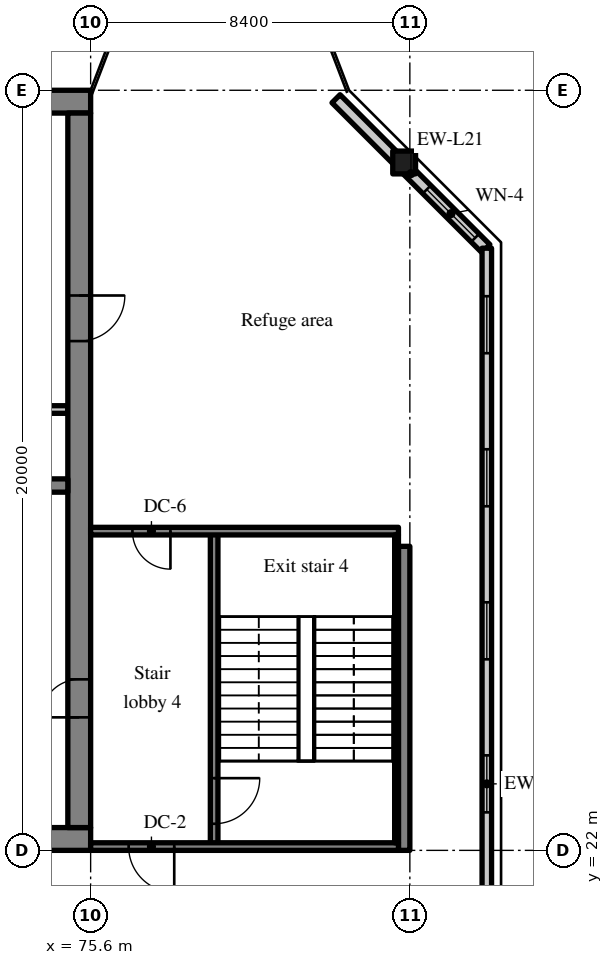
"""IFC4 building model, lengths in metres.
Left out: names, types, materials, properties, quantities, classifications, styles, units other than length and angle.
Written with IfcOpenShell. Run it as: python <this file> out.ifc"""

import sys

from ifc_helpers import new_model, si_unit, direction, frame, frame_2d, origin, origin_2d, place, context, subcontext, project, spatial, rectangle, extrude, source, transform, mapped, element, fill, save


model = new_model("IFC4")
c1 = context("Model", 3, precision=1e-05, world=origin(), true_north=direction((0.0, 1.0)))
c2 = subcontext(c1, "Body", "Model", "MODEL_VIEW")
j1 = project(units=[si_unit("LENGTHUNIT", "METRE"), si_unit("PLANEANGLEUNIT", "RADIAN")], contexts=[c1])
p1 = place(None, origin())
s1 = spatial("IfcSite", under=j1, at=p1, CompositionType="ELEMENT")
p2 = place(p1, origin())
s2 = spatial("IfcBuilding", under=s1, at=p2, CompositionType="ELEMENT")
p3 = place(p2, frame((0.0, 0.0, 253.0)))
s3 = spatial("IfcBuildingStorey", under=s2, at=p3, CompositionType="ELEMENT", Elevation=253.0)
m1 = source(origin(), c2, "Body", "SweptSolid", [
    extrude(rectangle(XDim=50.4, YDim=0.6, at=frame_2d((25.2, 0.0))), origin(), (0.0, 0.0, 1.0), 3.62),
])
p4 = place(p3, frame((25.2, 22.3, 0.0), z_axis=(0.0, 0.0, 1.0), x_axis=(1.0, 0.0, 0.0)))
e1 = element("IfcWall", 1, at=p4, inside=s3, PredefinedType="SHEAR", context=c2, shape_type="MappedRepresentation", body=[
    mapped(m1, transform((0.0, 0.0, 0.0), scale=1.0)),
])
m2 = source(origin(), c2, "Body", "SweptSolid", [
    extrude(rectangle(XDim=1.8, YDim=2.1, at=frame_2d((0.9, 1.05))), frame((0.0, 0.31, 0.0), z_axis=(0.0, -1.0, 0.0), x_axis=(1.0, 0.0, 0.0)), (0.0, 0.0, 1.0), 0.62),
])
p5 = place(p4, frame((15.9, 0.0, 0.0)))
e2 = element("IfcOpeningElement", 2, at=p5, cuts=e1, PredefinedType="OPENING", context=c2, shape_type="MappedRepresentation", body=[
    mapped(m2, transform((0.0, 0.0, 0.0), scale=1.0)),
])
m3 = source(origin(), c2, "Body", "SweptSolid", [
    extrude(rectangle(XDim=0.9, YDim=2.1, at=frame_2d((0.45, 1.05))), frame((0.0, 0.31, 0.0), z_axis=(0.0, -1.0, 0.0), x_axis=(1.0, 0.0, 0.0)), (0.0, 0.0, 1.0), 0.62),
])
p6 = place(p4, frame((21.513, 0.0, 0.0)))
e3 = element("IfcOpeningElement", 3, at=p6, cuts=e1, PredefinedType="OPENING", context=c2, shape_type="MappedRepresentation", body=[
    mapped(m3, transform((0.0, 0.0, 0.0), scale=1.0)),
])
p7 = place(p4, frame((32.7, 0.0, 0.0)))
e4 = element("IfcOpeningElement", 4, at=p7, cuts=e1, PredefinedType="OPENING", context=c2, shape_type="MappedRepresentation", body=[
    mapped(m2, transform((0.0, 0.0, 0.0), scale=1.0)),
])
m4 = source(origin(), c2, "Body", "SweptSolid", [
    extrude(rectangle(XDim=1.2, YDim=2.1, at=frame_2d((0.6, 1.05))), frame((0.0, 0.31, 0.0), z_axis=(0.0, -1.0, 0.0), x_axis=(1.0, 0.0, 0.0)), (0.0, 0.0, 1.0), 0.62),
])
p8 = place(p4, frame((6.488, 0.0, 0.0)))
e5 = element("IfcOpeningElement", 5, at=p8, cuts=e1, PredefinedType="OPENING", context=c2, shape_type="MappedRepresentation", body=[
    mapped(m4, transform((0.0, 0.0, 0.0), scale=1.0)),
])
p9 = place(p4, frame((47.925, 0.0, 0.0)))
e6 = element("IfcOpeningElement", 6, at=p9, cuts=e1, PredefinedType="OPENING", context=c2, shape_type="MappedRepresentation", body=[
    mapped(m4, transform((0.0, 0.0, 0.0), scale=1.0)),
])
p10 = place(p3, frame((25.2, 41.7, 0.0), z_axis=(0.0, 0.0, 1.0), x_axis=(1.0, 0.0, 0.0)))
e7 = element("IfcWall", 7, at=p10, inside=s3, PredefinedType="SHEAR", context=c2, shape_type="MappedRepresentation", body=[
    mapped(m1, transform((0.0, 0.0, 0.0), scale=1.0)),
])
m5 = source(origin(), c2, "Body", "SweptSolid", [
    extrude(rectangle(XDim=18.8, YDim=0.6, at=frame_2d((9.4, 0.0))), origin(), (0.0, 0.0, 1.0), 3.62),
])
p11 = place(p3, frame((75.3, 22.6, 0.0), z_axis=(0.0, 0.0, 1.0), x_axis=(0.0, 1.0, 0.0)))
e8 = element("IfcWall", 8, at=p11, inside=s3, PredefinedType="SHEAR", context=c2, shape_type="MappedRepresentation", body=[
    mapped(m5, transform((0.0, 0.0, 0.0), scale=1.0)),
])
m6 = source(origin(), c2, "Body", "SweptSolid", [
    extrude(rectangle(XDim=1.0, YDim=2.1, at=frame_2d((0.5, 1.05))), frame((0.0, 0.31, 0.0), z_axis=(0.0, -1.0, 0.0), x_axis=(1.0, 0.0, 0.0)), (0.0, 0.0, 1.0), 0.62),
])
p12 = place(p11, frame((2.9, 0.0, 0.0)))
e9 = element("IfcOpeningElement", 9, at=p12, cuts=e8, PredefinedType="OPENING", context=c2, shape_type="MappedRepresentation", body=[
    mapped(m6, transform((0.0, 0.0, 0.0), scale=1.0)),
])
p13 = place(p11, frame((12.8, 0.0, 0.0)))
e10 = element("IfcOpeningElement", 10, at=p13, cuts=e8, PredefinedType="OPENING", context=c2, shape_type="MappedRepresentation", body=[
    mapped(m4, transform((0.0, 0.0, 0.0), scale=1.0)),
])
m7 = source(origin(), c2, "Body", "SweptSolid", [
    extrude(rectangle(XDim=7.625, YDim=0.35, at=frame_2d((3.812, 0.0))), origin(), (0.0, 0.0, 1.0), 3.62),
])
p14 = place(p3, frame((67.375, 31.6, 0.0), z_axis=(0.0, 0.0, 1.0), x_axis=(1.0, 0.0, 0.0)))
e11 = element("IfcWall", 11, at=p14, inside=s3, PredefinedType="SHEAR", context=c2, shape_type="MappedRepresentation", body=[
    mapped(m7, transform((0.0, 0.0, 0.0), scale=1.0)),
])
m8 = source(origin(), c2, "Body", "SweptSolid", [
    extrude(rectangle(XDim=1.1, YDim=2.1, at=frame_2d((0.55, 1.05))), frame((0.0, 0.185, 0.0), z_axis=(0.0, -1.0, 0.0), x_axis=(1.0, 0.0, 0.0)), (0.0, 0.0, 1.0), 0.37),
])
p15 = place(p14, frame((5.8, 0.0, 0.0)))
e12 = element("IfcOpeningElement", 12, at=p15, cuts=e11, PredefinedType="OPENING", context=c2, shape_type="MappedRepresentation", body=[
    mapped(m8, transform((0.0, 0.0, 0.0), scale=1.0)),
])
m9 = source(origin(), c2, "Body", "SweptSolid", [
    extrude(rectangle(XDim=8.0, YDim=0.3, at=frame_2d((4.0, 0.0))), origin(), (0.0, 0.0, 1.0), 3.62),
])
p16 = place(p3, frame((83.85, 22.0, 0.0), z_axis=(0.0, 0.0, 1.0), x_axis=(0.0, 1.0, 0.0)))
e13 = element("IfcWall", 13, at=p16, inside=s3, PredefinedType="SHEAR", context=c2, shape_type="MappedRepresentation", body=[
    mapped(m9, transform((0.0, 0.0, 0.0), scale=1.0)),
])
m10 = source(origin(), c2, "Body", "SweptSolid", [
    extrude(rectangle(XDim=0.6, YDim=0.6, at=origin_2d()), origin(), (0.0, 0.0, 1.0), 3.62),
])
p17 = place(p3, frame((83.85, 40.1, 0.0), z_axis=(0.0, 0.0, 1.0), x_axis=(1.0, 0.0, 0.0)))
e14 = element("IfcColumn", 14, at=p17, inside=s3, PredefinedType="COLUMN", context=c2, shape_type="MappedRepresentation", body=[
    mapped(m10, transform((0.0, 0.0, 0.0), scale=1.0)),
])
m11 = source(origin(), c2, "Body", "SweptSolid", [
    extrude(rectangle(XDim=5.576, YDim=0.3, at=frame_2d((2.788, 0.0))), origin(), (0.0, 0.0, 1.0), 3.62),
])
p18 = place(p3, frame((86.0, 37.834, 0.0), z_axis=(0.0, 0.0, 1.0), x_axis=(-0.707106781187, 0.707106781187, 0.0)))
e15 = element("IfcWall", 15, at=p18, inside=s3, PredefinedType="SOLIDWALL", context=c2, shape_type="MappedRepresentation", body=[
    mapped(m11, transform((0.0, 0.0, 0.0), scale=1.0)),
])
m12 = source(origin(), c2, "Body", "SweptSolid", [
    extrude(rectangle(XDim=1.8, YDim=1.5, at=frame_2d((0.9, 0.75))), frame((0.0, 0.16, 0.0), z_axis=(0.0, -1.0, 0.0), x_axis=(1.0, 0.0, 0.0)), (0.0, 0.0, 1.0), 0.32),
])
p19 = place(p18, frame((0.399, 0.0, 0.9)))
e16 = element("IfcOpeningElement", 16, at=p19, cuts=e15, PredefinedType="OPENING", context=c2, shape_type="MappedRepresentation", body=[
    mapped(m12, transform((0.0, 0.0, 0.0), scale=1.0)),
])
m13 = source(origin(), c2, "Body", "SweptSolid", [
    extrude(rectangle(XDim=28.189, YDim=0.25, at=frame_2d((14.095, 0.0))), origin(), (0.0, 0.0, 1.0), 3.62),
])
p20 = place(p3, frame((86.025, 9.655, 0.0), z_axis=(0.0, 0.0, 1.0), x_axis=(0.0, 1.0, 0.0)))
e17 = element("IfcWall", 17, at=p20, inside=s3, PredefinedType="SOLIDWALL", context=c2, shape_type="MappedRepresentation", body=[
    mapped(m13, transform((0.0, 0.0, 0.0), scale=1.0)),
])
m14 = source(origin(), c2, "Body", "SweptSolid", [
    extrude(rectangle(XDim=1.5, YDim=1.5, at=frame_2d((0.75, 0.75))), frame((0.0, 0.135, 0.0), z_axis=(0.0, -1.0, 0.0), x_axis=(1.0, 0.0, 0.0)), (0.0, 0.0, 1.0), 0.27),
])
p21 = place(p20, frame((1.263, 0.0, 0.9)))
e18 = element("IfcOpeningElement", 18, at=p21, cuts=e17, PredefinedType="OPENING", context=c2, shape_type="MappedRepresentation", body=[
    mapped(m14, transform((0.0, 0.0, 0.0), scale=1.0)),
])
p22 = place(p20, frame((5.291, 0.0, 0.9)))
e19 = element("IfcOpeningElement", 19, at=p22, cuts=e17, PredefinedType="OPENING", context=c2, shape_type="MappedRepresentation", body=[
    mapped(m14, transform((0.0, 0.0, 0.0), scale=1.0)),
])
p23 = place(p20, frame((9.318, 0.0, 0.9)))
e20 = element("IfcOpeningElement", 20, at=p23, cuts=e17, PredefinedType="OPENING", context=c2, shape_type="MappedRepresentation", body=[
    mapped(m14, transform((0.0, 0.0, 0.0), scale=1.0)),
])
p24 = place(p20, frame((13.345, 0.0, 0.9)))
e21 = element("IfcOpeningElement", 21, at=p24, cuts=e17, PredefinedType="OPENING", context=c2, shape_type="MappedRepresentation", body=[
    mapped(m14, transform((0.0, 0.0, 0.0), scale=1.0)),
])
p25 = place(p20, frame((17.372, 0.0, 0.9)))
e22 = element("IfcOpeningElement", 22, at=p25, cuts=e17, PredefinedType="OPENING", context=c2, shape_type="MappedRepresentation", body=[
    mapped(m14, transform((0.0, 0.0, 0.0), scale=1.0)),
])
p26 = place(p20, frame((21.399, 0.0, 0.9)))
e23 = element("IfcOpeningElement", 23, at=p26, cuts=e17, PredefinedType="OPENING", context=c2, shape_type="MappedRepresentation", body=[
    mapped(m14, transform((0.0, 0.0, 0.0), scale=1.0)),
])
p27 = place(p20, frame((25.426, 0.0, 0.9)))
e24 = element("IfcOpeningElement", 24, at=p27, cuts=e17, PredefinedType="OPENING", context=c2, shape_type="MappedRepresentation", body=[
    mapped(m14, transform((0.0, 0.0, 0.0), scale=1.0)),
])
m15 = source(origin(), c2, "Body", "SweptSolid", [
    extrude(rectangle(XDim=2.55, YDim=0.2, at=frame_2d((1.275, 0.0))), origin(), (0.0, 0.0, 1.0), 3.62),
])
p28 = place(p3, frame((72.45, 33.6, 0.0), z_axis=(0.0, 0.0, 1.0), x_axis=(1.0, 0.0, 0.0)))
e25 = element("IfcWall", 25, at=p28, inside=s3, PredefinedType="SOLIDWALL", context=c2, shape_type="MappedRepresentation", body=[
    mapped(m15, transform((0.0, 0.0, 0.0), scale=1.0)),
])
m16 = source(origin(), c2, "Body", "SweptSolid", [
    extrude(rectangle(XDim=8.3, YDim=0.2, at=frame_2d((4.15, 0.0))), origin(), (0.0, 0.0, 1.0), 3.62),
])
p29 = place(p3, frame((78.85, 22.1, 0.0), z_axis=(0.0, 0.0, 1.0), x_axis=(0.0, 1.0, 0.0)))
e26 = element("IfcWall", 26, at=p29, inside=s3, PredefinedType="SOLIDWALL", context=c2, shape_type="MappedRepresentation", body=[
    mapped(m16, transform((0.0, 0.0, 0.0), scale=1.0)),
])
m17 = source(origin(), c2, "Body", "SweptSolid", [
    extrude(rectangle(XDim=1.2, YDim=2.1, at=frame_2d((0.6, 1.05))), frame((0.0, 0.11, 0.0), z_axis=(0.0, -1.0, 0.0), x_axis=(1.0, 0.0, 0.0)), (0.0, 0.0, 1.0), 0.22),
])
p30 = place(p29, frame((0.6, 0.0, 0.0)))
e27 = element("IfcOpeningElement", 27, at=p30, cuts=e26, PredefinedType="OPENING", context=c2, shape_type="MappedRepresentation", body=[
    mapped(m17, transform((0.0, 0.0, 0.0), scale=1.0)),
])
m18 = source(origin(), c2, "Body", "SweptSolid", [
    extrude(rectangle(XDim=8.1, YDim=0.2, at=frame_2d((4.05, 0.0))), origin(), (0.0, 0.0, 1.0), 3.62),
])
p31 = place(p3, frame((83.7, 22.1, 0.0), z_axis=(0.0, 0.0, 1.0), x_axis=(-1.0, 0.0, 0.0)))
e28 = element("IfcWall", 28, at=p31, inside=s3, PredefinedType="SOLIDWALL", context=c2, shape_type="MappedRepresentation", body=[
    mapped(m18, transform((0.0, 0.0, 0.0), scale=1.0)),
])
p32 = place(p31, frame((5.9, 0.0, 0.0)))
e29 = element("IfcOpeningElement", 29, at=p32, cuts=e28, PredefinedType="OPENING", context=c2, shape_type="MappedRepresentation", body=[
    mapped(m17, transform((0.0, 0.0, 0.0), scale=1.0)),
])
p33 = place(p3, frame((83.7, 30.4, 0.0), z_axis=(0.0, 0.0, 1.0), x_axis=(-1.0, 0.0, 0.0)))
e30 = element("IfcWall", 30, at=p33, inside=s3, PredefinedType="SOLIDWALL", context=c2, shape_type="MappedRepresentation", body=[
    mapped(m18, transform((0.0, 0.0, 0.0), scale=1.0)),
])
m19 = source(origin(), c2, "Body", "SweptSolid", [
    extrude(rectangle(XDim=1.0, YDim=2.1, at=frame_2d((0.5, 1.05))), frame((0.0, 0.11, 0.0), z_axis=(0.0, -1.0, 0.0), x_axis=(1.0, 0.0, 0.0)), (0.0, 0.0, 1.0), 0.22),
])
p34 = place(p33, frame((6.0, 0.0, 0.0)))
e31 = element("IfcOpeningElement", 31, at=p34, cuts=e30, PredefinedType="OPENING", context=c2, shape_type="MappedRepresentation", body=[
    mapped(m19, transform((0.0, 0.0, 0.0), scale=1.0)),
])
m20 = source(origin(), c2, "Body", "SweptSolid", [
    extrude(rectangle(XDim=8.1, YDim=0.1, at=frame_2d((4.05, 0.0))), origin(), (0.0, 0.0, 1.0), 3.62),
])
p35 = place(p3, frame((83.65, 22.2, 0.0), z_axis=(0.0, 0.0, 1.0), x_axis=(0.0, 1.0, 0.0)))
e32 = element("IfcWall", 32, at=p35, inside=s3, PredefinedType="SOLIDWALL", context=c2, shape_type="MappedRepresentation", body=[
    mapped(m20, transform((0.0, 0.0, 0.0), scale=1.0)),
])
m21 = source(origin(), c2, "Body", "SweptSolid", [
    extrude(rectangle(XDim=1.8, YDim=1.5, at=frame_2d((0.9, 0.75))), frame((0.0, 0.03, 0.0), z_axis=(0.0, -1.0, 0.0), x_axis=(1.0, 0.0, 0.0)), (0.0, 0.0, 1.0), 0.06),
])
p36 = place(p19, origin())
e33 = element("IfcWindow", 33, at=p36, inside=s3, PartitioningType="SINGLE_PANEL", PredefinedType="WINDOW", context=c2, shape_type="MappedRepresentation", body=[
    mapped(m21, transform((0.0, 0.0, 0.0), scale=1.0)),
])
fill(e16, e33)
m22 = source(origin(), c2, "Body", "SweptSolid", [
    extrude(rectangle(XDim=1.5, YDim=1.5, at=frame_2d((0.75, 0.75))), frame((0.0, 0.03, 0.0), z_axis=(0.0, -1.0, 0.0), x_axis=(1.0, 0.0, 0.0)), (0.0, 0.0, 1.0), 0.06),
])
p37 = place(p24, origin())
e34 = element("IfcWindow", 34, at=p37, inside=s3, PartitioningType="SINGLE_PANEL", PredefinedType="WINDOW", context=c2, shape_type="MappedRepresentation", body=[
    mapped(m22, transform((0.0, 0.0, 0.0), scale=1.0)),
])
fill(e21, e34)
p38 = place(p25, origin())
e35 = element("IfcWindow", 35, at=p38, inside=s3, PartitioningType="SINGLE_PANEL", PredefinedType="WINDOW", context=c2, shape_type="MappedRepresentation", body=[
    mapped(m22, transform((0.0, 0.0, 0.0), scale=1.0)),
])
fill(e22, e35)
p39 = place(p26, origin())
e36 = element("IfcWindow", 36, at=p39, inside=s3, PartitioningType="SINGLE_PANEL", PredefinedType="WINDOW", context=c2, shape_type="MappedRepresentation", body=[
    mapped(m22, transform((0.0, 0.0, 0.0), scale=1.0)),
])
fill(e23, e36)
p40 = place(p27, origin())
e37 = element("IfcWindow", 37, at=p40, inside=s3, PartitioningType="SINGLE_PANEL", PredefinedType="WINDOW", context=c2, shape_type="MappedRepresentation", body=[
    mapped(m22, transform((0.0, 0.0, 0.0), scale=1.0)),
])
fill(e24, e37)
m23 = source(origin(), c2, "Body", "SweptSolid", [
    extrude(rectangle(XDim=1.0, YDim=2.1, at=frame_2d((0.5, 1.05))), frame((0.0, 0.025, 0.0), z_axis=(0.0, -1.0, 0.0), x_axis=(1.0, 0.0, 0.0)), (0.0, 0.0, 1.0), 0.05),
])
p41 = place(p12, origin())
e38 = element("IfcDoor", 38, at=p41, inside=s3, OperationType="SINGLE_SWING_LEFT", PredefinedType="DOOR", context=c2, shape_type="MappedRepresentation", body=[
    mapped(m23, transform((0.0, 0.0, 0.0), scale=1.0)),
])
fill(e9, e38)
m24 = source(origin(), c2, "Body", "SweptSolid", [
    extrude(rectangle(XDim=1.2, YDim=2.1, at=frame_2d((0.6, 1.05))), frame((0.0, 0.025, 0.0), z_axis=(0.0, -1.0, 0.0), x_axis=(1.0, 0.0, 0.0)), (0.0, 0.0, 1.0), 0.05),
])
p42 = place(p13, origin())
e39 = element("IfcDoor", 39, at=p42, inside=s3, OperationType="SINGLE_SWING_RIGHT", PredefinedType="DOOR", context=c2, shape_type="MappedRepresentation", body=[
    mapped(m24, transform((0.0, 0.0, 0.0), scale=1.0)),
])
fill(e10, e39)
p43 = place(p30, origin())
e40 = element("IfcDoor", 40, at=p43, inside=s3, OperationType="SINGLE_SWING_RIGHT", PredefinedType="DOOR", context=c2, shape_type="MappedRepresentation", body=[
    mapped(m24, transform((0.0, 0.0, 0.0), scale=1.0)),
])
fill(e27, e40)
p44 = place(p32, origin())
e41 = element("IfcDoor", 41, at=p44, inside=s3, OperationType="SINGLE_SWING_LEFT", PredefinedType="DOOR", context=c2, shape_type="MappedRepresentation", body=[
    mapped(m24, transform((0.0, 0.0, 0.0), scale=1.0)),
])
fill(e29, e41)
p45 = place(p34, origin())
e42 = element("IfcDoor", 42, at=p45, inside=s3, OperationType="SINGLE_SWING_LEFT", PredefinedType="DOOR", context=c2, shape_type="MappedRepresentation", body=[
    mapped(m23, transform((0.0, 0.0, 0.0), scale=1.0)),
])
fill(e31, e42)
save(model, sys.argv[1])
